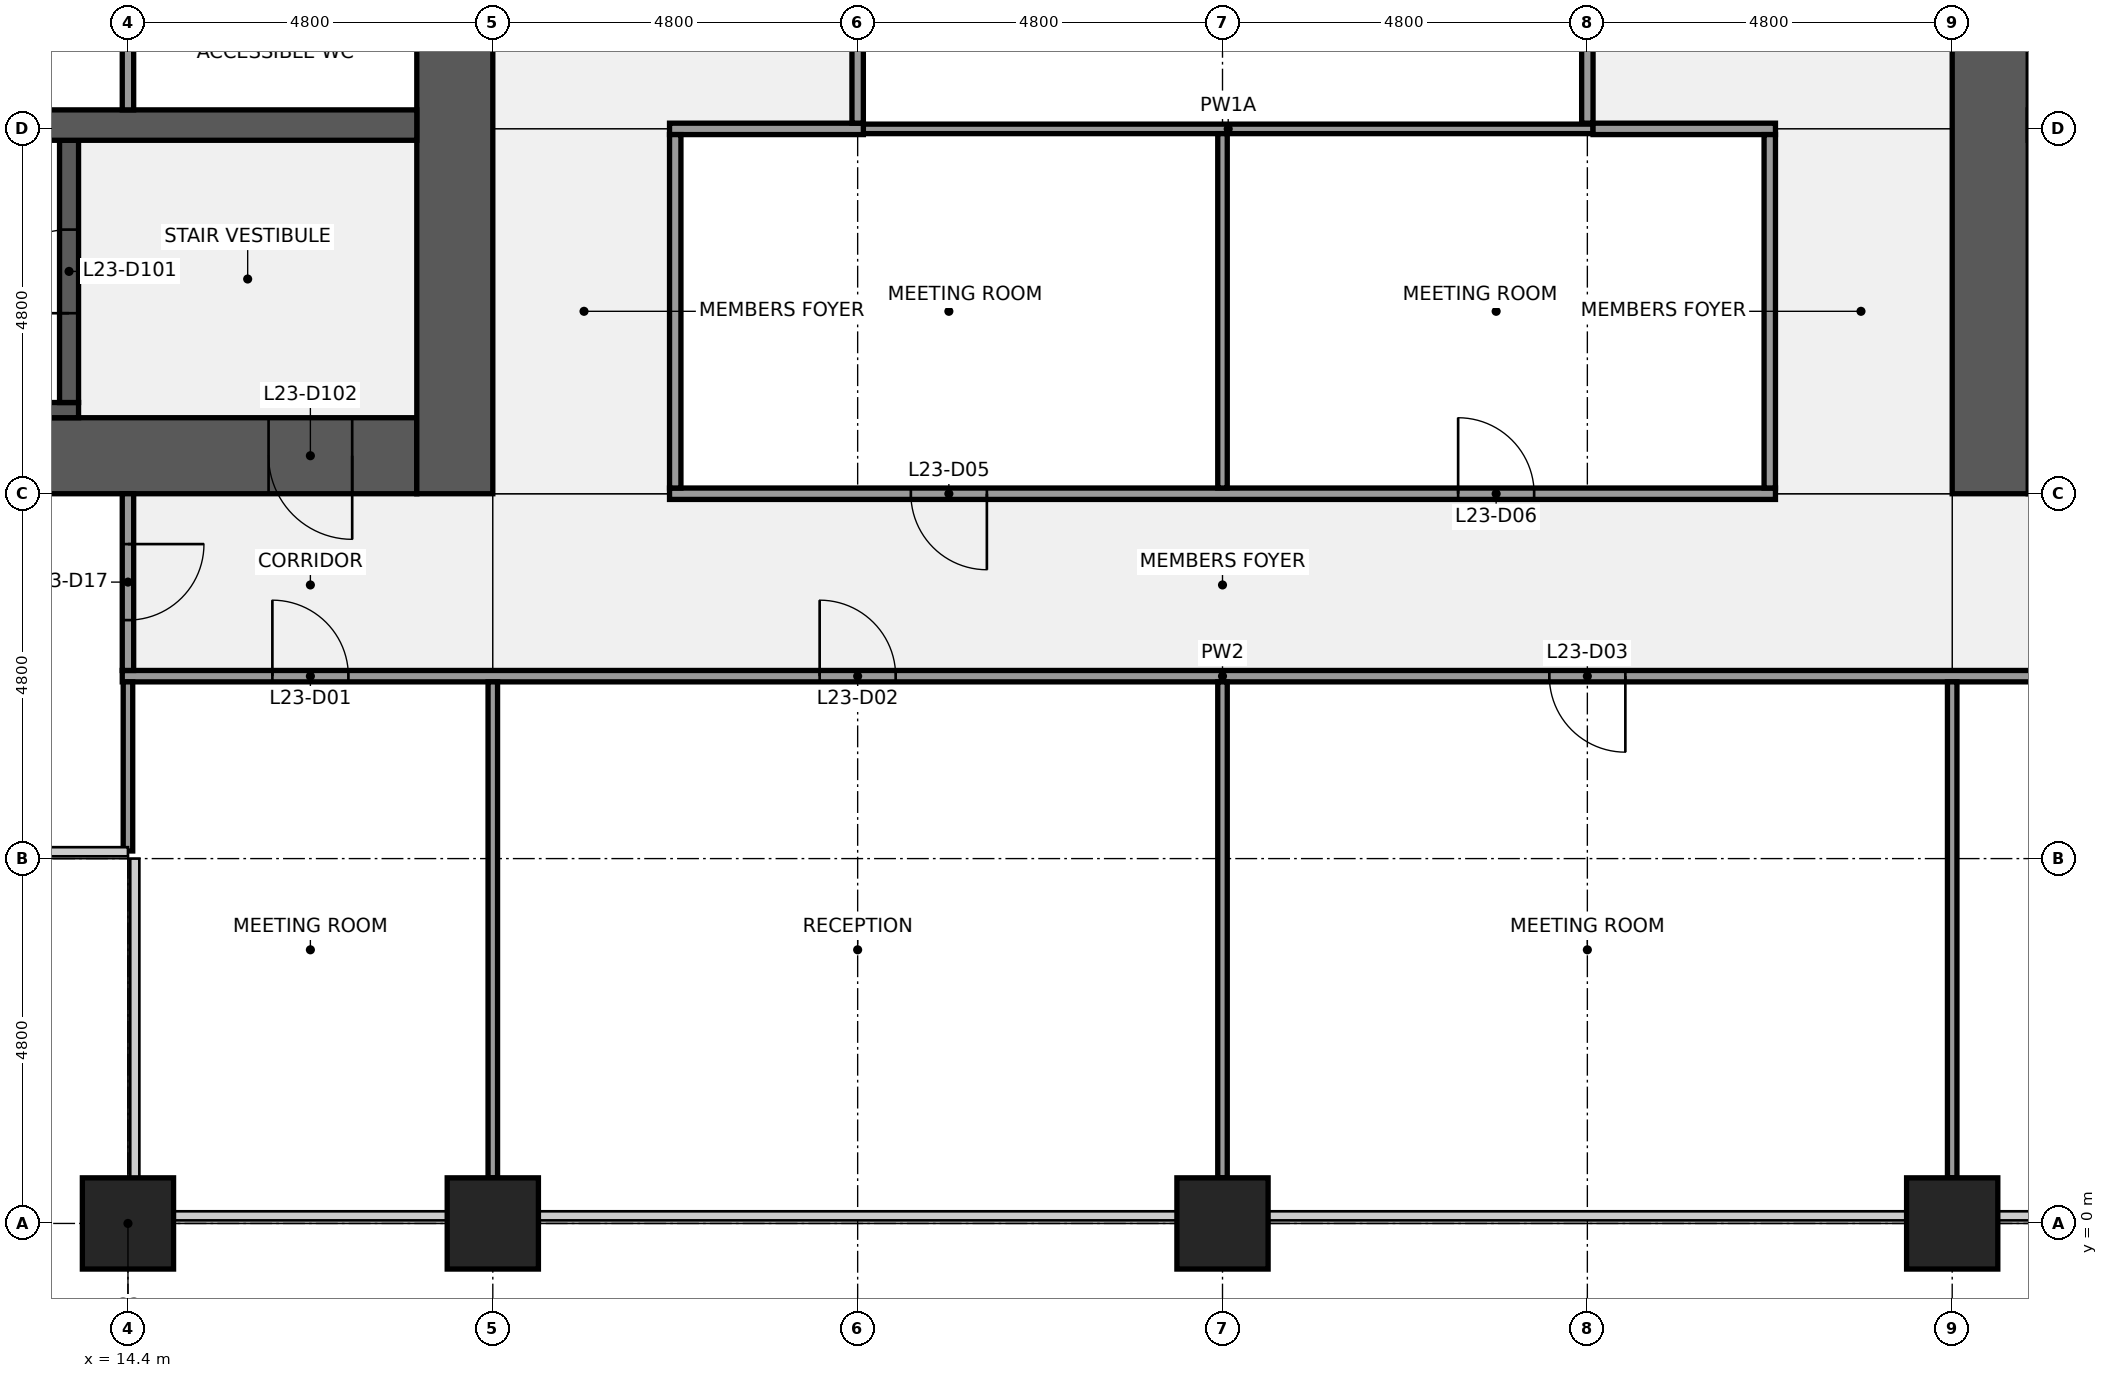
"""IFC4 building model, lengths in metres.
Left out: names, types, materials, properties, quantities, classifications, styles, units other than length and angle.
Written with IfcOpenShell. Run it as: python <this file> out.ifc"""

import sys

from ifc_helpers import new_model, si_unit, direction, frame, frame_2d, origin, origin_2d, place, context, subcontext, project, spatial, rectangle, extrude, element, fill, save


model = new_model("IFC4")
c1 = context("Model", 3, precision=1e-05, world=origin(), true_north=direction((0.0, 1.0)))
c2 = subcontext(c1, "Body", "Model", "MODEL_VIEW")
j1 = project(units=[si_unit("LENGTHUNIT", "METRE"), si_unit("PLANEANGLEUNIT", "RADIAN")], contexts=[c1])
p1 = place(None, origin())
s1 = spatial("IfcSite", under=j1, at=p1, CompositionType="ELEMENT")
p2 = place(p1, origin())
s2 = spatial("IfcBuilding", under=s1, at=p2, CompositionType="ELEMENT")
p3 = place(p2, frame((0.0, 0.0, 112.1)))
s3 = spatial("IfcBuildingStorey", under=s2, at=p3, CompositionType="ELEMENT", Elevation=112.1)
for number, where, z_axis, x_axis in (
    (1, (14.4, 0.0, 0.0), (0.0, 0.0, 1.0), (1.0, 0.0, 0.0)),
    (2, (19.2, 0.0, 0.0), (0.0, 0.0, 1.0), (1.0, 0.0, 0.0)),
    (3, (28.8, 0.0, 0.0), (0.0, 0.0, 1.0), (1.0, 0.0, 0.0)),
    (4, (38.4, 0.0, 0.0), (0.0, 0.0, 1.0), (1.0, 0.0, 0.0)),
):
    element("IfcColumn", number, at=place(p3, frame(where, z_axis=z_axis, x_axis=x_axis)), inside=s3, PredefinedType="COLUMN", context=c2, shape_type="SweptSolid", body=[
        extrude(rectangle(XDim=1.2, YDim=1.2, at=origin_2d()), origin(), (0.0, 0.0, 1.0), 4.0),
    ])
p4 = place(p3, frame((18.2, 10.1, 0.0), z_axis=(0.0, 0.0, 1.0), x_axis=(-1.0, 0.0, 0.0)))
e5 = element("IfcWall", 5, at=p4, inside=s3, PredefinedType="SHEAR", context=c2, shape_type="SweptSolid", body=[
    extrude(rectangle(XDim=8.6, YDim=1.0, at=frame_2d((4.3, 0.0))), origin(), (0.0, 0.0, 1.0), 3.84),
])
p5 = place(p4, frame((0.85, 0.0, 0.0)))
e6 = element("IfcOpeningElement", 6, at=p5, cuts=e5, PredefinedType="OPENING", context=c2, shape_type="SweptSolid", body=[
    extrude(rectangle(XDim=1.1, YDim=2.1, at=frame_2d((0.55, 1.05))), frame((0.0, 0.51, 0.0), z_axis=(0.0, -1.0, 0.0), x_axis=(1.0, 0.0, 0.0)), (0.0, 0.0, 1.0), 1.02),
])
p6 = place(p3, frame((18.7, 38.4, 0.0), z_axis=(0.0, 0.0, 1.0), x_axis=(0.0, -1.0, 0.0)))
e7 = element("IfcWall", 7, at=p6, inside=s3, PredefinedType="SHEAR", context=c2, shape_type="SweptSolid", body=[
    extrude(rectangle(XDim=28.8, YDim=1.0, at=frame_2d((14.4, 0.0))), origin(), (0.0, 0.0, 1.0), 3.84),
])
p7 = place(p6, frame((18.3, 0.0, 0.0)))
e8 = element("IfcOpeningElement", 8, at=p7, cuts=e7, PredefinedType="OPENING", context=c2, shape_type="SweptSolid", body=[
    extrude(rectangle(XDim=1.8, YDim=2.1, at=frame_2d((0.9, 1.05))), frame((0.0, 0.51, 0.0), z_axis=(0.0, -1.0, 0.0), x_axis=(1.0, 0.0, 0.0)), (0.0, 0.0, 1.0), 1.02),
])
p8 = place(p6, frame((8.7, 0.0, 0.0)))
e9 = element("IfcOpeningElement", 9, at=p8, cuts=e7, PredefinedType="OPENING", context=c2, shape_type="SweptSolid", body=[
    extrude(rectangle(XDim=1.8, YDim=2.1, at=frame_2d((0.9, 1.05))), frame((0.0, 0.51, 0.0), z_axis=(0.0, -1.0, 0.0), x_axis=(1.0, 0.0, 0.0)), (0.0, 0.0, 1.0), 1.02),
])
p9 = place(p3, frame((9.6, 10.7, 0.0), z_axis=(0.0, 0.0, 1.0), x_axis=(1.0, 0.0, 0.0)))
e10 = element("IfcWall", 10, at=p9, inside=s3, PredefinedType="SHEAR", context=c2, shape_type="SweptSolid", body=[
    extrude(rectangle(XDim=4.15, YDim=0.2, at=frame_2d((2.075, 0.0))), origin(), (0.0, 0.0, 1.0), 3.84),
])
p10 = place(p3, frame((13.625, 10.8, 0.0), z_axis=(0.0, 0.0, 1.0), x_axis=(0.0, 1.0, 0.0)))
e11 = element("IfcWall", 11, at=p10, inside=s3, PredefinedType="SHEAR", context=c2, shape_type="SweptSolid", body=[
    extrude(rectangle(XDim=3.45, YDim=0.25, at=frame_2d((1.725, 0.0))), origin(), (0.0, 0.0, 1.0), 3.84),
])
p11 = place(p10, frame((1.175, 0.0, 0.0)))
e12 = element("IfcOpeningElement", 12, at=p11, cuts=e11, PredefinedType="OPENING", context=c2, shape_type="SweptSolid", body=[
    extrude(rectangle(XDim=1.1, YDim=2.1, at=frame_2d((0.55, 1.05))), frame((0.0, 0.135, 0.0), z_axis=(0.0, -1.0, 0.0), x_axis=(1.0, 0.0, 0.0)), (0.0, 0.0, 1.0), 0.27),
])
p12 = place(p3, frame((1.0, 14.45, 0.0), z_axis=(0.0, 0.0, 1.0), x_axis=(1.0, 0.0, 0.0)))
e13 = element("IfcWall", 13, at=p12, inside=s3, PredefinedType="SHEAR", context=c2, shape_type="SweptSolid", body=[
    extrude(rectangle(XDim=17.2, YDim=0.4, at=frame_2d((8.6, 0.0))), origin(), (0.0, 0.0, 1.0), 3.84),
])
p13 = place(p3, frame((14.4, 14.65, 0.0), z_axis=(0.0, 0.0, 1.0), x_axis=(0.0, 1.0, 0.0)))
e14 = element("IfcWall", 14, at=p13, inside=s3, PredefinedType="PARTITIONING", context=c2, shape_type="SweptSolid", body=[
    extrude(rectangle(XDim=2.6, YDim=0.15, at=frame_2d((1.3, 0.0))), origin(), (0.0, 0.0, 1.0), 3.84),
])
p14 = place(p3, frame((52.8, 10.1, 0.0), z_axis=(0.0, 0.0, 1.0), x_axis=(-1.0, 0.0, 0.0)))
e15 = element("IfcWall", 15, at=p14, inside=s3, PredefinedType="SHEAR", context=c2, shape_type="SweptSolid", body=[
    extrude(rectangle(XDim=13.4, YDim=1.0, at=frame_2d((6.7, 0.0))), origin(), (0.0, 0.0, 1.0), 3.84),
])
p15 = place(p14, frame((11.45, 0.0, 0.0)))
e16 = element("IfcOpeningElement", 16, at=p15, cuts=e15, PredefinedType="OPENING", context=c2, shape_type="SweptSolid", body=[
    extrude(rectangle(XDim=1.1, YDim=2.1, at=frame_2d((0.55, 1.05))), frame((0.0, 0.51, 0.0), z_axis=(0.0, -1.0, 0.0), x_axis=(1.0, 0.0, 0.0)), (0.0, 0.0, 1.0), 1.02),
])
p16 = place(p3, frame((38.9, 9.6, 0.0), z_axis=(0.0, 0.0, 1.0), x_axis=(0.0, 1.0, 0.0)))
e17 = element("IfcWall", 17, at=p16, inside=s3, PredefinedType="SHEAR", context=c2, shape_type="SweptSolid", body=[
    extrude(rectangle(XDim=28.8, YDim=1.0, at=frame_2d((14.4, 0.0))), origin(), (0.0, 0.0, 1.0), 3.84),
])
p17 = place(p16, frame((8.7, 0.0, 0.0)))
e18 = element("IfcOpeningElement", 18, at=p17, cuts=e17, PredefinedType="OPENING", context=c2, shape_type="SweptSolid", body=[
    extrude(rectangle(XDim=1.8, YDim=2.1, at=frame_2d((0.9, 1.05))), frame((0.0, 0.51, 0.0), z_axis=(0.0, -1.0, 0.0), x_axis=(1.0, 0.0, 0.0)), (0.0, 0.0, 1.0), 1.02),
])
p18 = place(p16, frame((18.3, 0.0, 0.0)))
e19 = element("IfcOpeningElement", 19, at=p18, cuts=e17, PredefinedType="OPENING", context=c2, shape_type="SweptSolid", body=[
    extrude(rectangle(XDim=1.8, YDim=2.1, at=frame_2d((0.9, 1.05))), frame((0.0, 0.51, 0.0), z_axis=(0.0, -1.0, 0.0), x_axis=(1.0, 0.0, 0.0)), (0.0, 0.0, 1.0), 1.02),
])
p19 = place(p3, frame((14.325, 7.2, 0.0), z_axis=(0.0, 0.0, 1.0), x_axis=(1.0, 0.0, 0.0)))
e20 = element("IfcWall", 20, at=p19, inside=s3, PredefinedType="PARTITIONING", context=c2, shape_type="SweptSolid", body=[
    extrude(rectangle(XDim=28.95, YDim=0.15, at=frame_2d((14.475, 0.0))), origin(), (0.0, 0.0, 1.0), 2.849),
])
p20 = place(p19, frame((1.975, 0.0, 0.0)))
e21 = element("IfcOpeningElement", 21, at=p20, cuts=e20, PredefinedType="OPENING", context=c2, shape_type="SweptSolid", body=[
    extrude(rectangle(XDim=1.0, YDim=2.1, at=frame_2d((0.5, 1.05))), frame((0.0, 0.085, 0.0), z_axis=(0.0, -1.0, 0.0), x_axis=(1.0, 0.0, 0.0)), (0.0, 0.0, 1.0), 0.17),
])
p21 = place(p19, frame((9.175, 0.0, 0.0)))
e22 = element("IfcOpeningElement", 22, at=p21, cuts=e20, PredefinedType="OPENING", context=c2, shape_type="SweptSolid", body=[
    extrude(rectangle(XDim=1.0, YDim=2.1, at=frame_2d((0.5, 1.05))), frame((0.0, 0.085, 0.0), z_axis=(0.0, -1.0, 0.0), x_axis=(1.0, 0.0, 0.0)), (0.0, 0.0, 1.0), 0.17),
])
p22 = place(p19, frame((18.775, 0.0, 0.0)))
e23 = element("IfcOpeningElement", 23, at=p22, cuts=e20, PredefinedType="OPENING", context=c2, shape_type="SweptSolid", body=[
    extrude(rectangle(XDim=1.0, YDim=2.1, at=frame_2d((0.5, 1.05))), frame((0.0, 0.085, 0.0), z_axis=(0.0, -1.0, 0.0), x_axis=(1.0, 0.0, 0.0)), (0.0, 0.0, 1.0), 0.17),
])
p23 = place(p19, frame((25.975, 0.0, 0.0)))
e24 = element("IfcOpeningElement", 24, at=p23, cuts=e20, PredefinedType="OPENING", context=c2, shape_type="SweptSolid", body=[
    extrude(rectangle(XDim=1.0, YDim=2.1, at=frame_2d((0.5, 1.05))), frame((0.0, 0.085, 0.0), z_axis=(0.0, -1.0, 0.0), x_axis=(1.0, 0.0, 0.0)), (0.0, 0.0, 1.0), 0.17),
])
p24 = place(p3, frame((21.525, 9.6, 0.0), z_axis=(0.0, 0.0, 1.0), x_axis=(1.0, 0.0, 0.0)))
e25 = element("IfcWall", 25, at=p24, inside=s3, PredefinedType="PARTITIONING", context=c2, shape_type="SweptSolid", body=[
    extrude(rectangle(XDim=14.55, YDim=0.15, at=frame_2d((7.275, 0.0))), origin(), (0.0, 0.0, 1.0), 2.849),
])
p25 = place(p24, frame((3.175, 0.0, 0.0)))
e26 = element("IfcOpeningElement", 26, at=p25, cuts=e25, PredefinedType="OPENING", context=c2, shape_type="SweptSolid", body=[
    extrude(rectangle(XDim=1.0, YDim=2.1, at=frame_2d((0.5, 1.05))), frame((0.0, 0.085, 0.0), z_axis=(0.0, -1.0, 0.0), x_axis=(1.0, 0.0, 0.0)), (0.0, 0.0, 1.0), 0.17),
])
p26 = place(p24, frame((10.375, 0.0, 0.0)))
e27 = element("IfcOpeningElement", 27, at=p26, cuts=e25, PredefinedType="OPENING", context=c2, shape_type="SweptSolid", body=[
    extrude(rectangle(XDim=1.0, YDim=2.1, at=frame_2d((0.5, 1.05))), frame((0.0, 0.085, 0.0), z_axis=(0.0, -1.0, 0.0), x_axis=(1.0, 0.0, 0.0)), (0.0, 0.0, 1.0), 0.17),
])
p27 = place(p3, frame((24.075, 14.4, 0.0), z_axis=(0.0, 0.0, 1.0), x_axis=(1.0, 0.0, 0.0)))
e28 = element("IfcWall", 28, at=p27, inside=s3, PredefinedType="PARTITIONING", context=c2, shape_type="SweptSolid", body=[
    extrude(rectangle(XDim=9.6, YDim=0.125, at=frame_2d((4.8, 0.0))), origin(), (0.0, 0.0, 1.0), 2.849),
])
p28 = place(p3, frame((21.525, 14.4, 0.0), z_axis=(0.0, 0.0, 1.0), x_axis=(1.0, 0.0, 0.0)))
e29 = element("IfcWall", 29, at=p28, inside=s3, PredefinedType="PARTITIONING", context=c2, shape_type="SweptSolid", body=[
    extrude(rectangle(XDim=2.55, YDim=0.15, at=frame_2d((1.275, 0.0))), origin(), (0.0, 0.0, 1.0), 2.849),
])
p29 = place(p3, frame((33.675, 14.4, 0.0), z_axis=(0.0, 0.0, 1.0), x_axis=(1.0, 0.0, 0.0)))
e30 = element("IfcWall", 30, at=p29, inside=s3, PredefinedType="PARTITIONING", context=c2, shape_type="SweptSolid", body=[
    extrude(rectangle(XDim=2.4, YDim=0.15, at=frame_2d((1.2, 0.0))), origin(), (0.0, 0.0, 1.0), 2.849),
])
p30 = place(p3, frame((14.4, 4.9, 0.0), z_axis=(0.0, 0.0, 1.0), x_axis=(0.0, 1.0, 0.0)))
e31 = element("IfcWall", 31, at=p30, inside=s3, PredefinedType="PARTITIONING", context=c2, shape_type="SweptSolid", body=[
    extrude(rectangle(XDim=2.225, YDim=0.125, at=frame_2d((1.113, 0.0))), origin(), (0.0, 0.0, 1.0), 2.849),
])
p31 = place(p3, frame((14.4, 7.275, 0.0), z_axis=(0.0, 0.0, 1.0), x_axis=(0.0, 1.0, 0.0)))
e32 = element("IfcWall", 32, at=p31, inside=s3, PredefinedType="PARTITIONING", context=c2, shape_type="SweptSolid", body=[
    extrude(rectangle(XDim=2.325, YDim=0.15, at=frame_2d((1.163, 0.0))), origin(), (0.0, 0.0, 1.0), 2.849),
])
p32 = place(p31, frame((0.663, 0.0, 0.0)))
e33 = element("IfcOpeningElement", 33, at=p32, cuts=e32, PredefinedType="OPENING", context=c2, shape_type="SweptSolid", body=[
    extrude(rectangle(XDim=1.0, YDim=2.1, at=frame_2d((0.5, 1.05))), frame((0.0, 0.085, 0.0), z_axis=(0.0, -1.0, 0.0), x_axis=(1.0, 0.0, 0.0)), (0.0, 0.0, 1.0), 0.17),
])
p33 = place(p3, frame((19.2, 0.6, 0.0), z_axis=(0.0, 0.0, 1.0), x_axis=(0.0, 1.0, 0.0)))
e34 = element("IfcWall", 34, at=p33, inside=s3, PredefinedType="PARTITIONING", context=c2, shape_type="SweptSolid", body=[
    extrude(rectangle(XDim=6.525, YDim=0.125, at=frame_2d((3.262, 0.0))), origin(), (0.0, 0.0, 1.0), 2.849),
])
p34 = place(p3, frame((21.6, 9.675, 0.0), z_axis=(0.0, 0.0, 1.0), x_axis=(0.0, 1.0, 0.0)))
e35 = element("IfcWall", 35, at=p34, inside=s3, PredefinedType="PARTITIONING", context=c2, shape_type="SweptSolid", body=[
    extrude(rectangle(XDim=4.65, YDim=0.15, at=frame_2d((2.325, 0.0))), origin(), (0.0, 0.0, 1.0), 2.849),
])
p35 = place(p3, frame((24.0, 14.475, 0.0), z_axis=(0.0, 0.0, 1.0), x_axis=(0.0, 1.0, 0.0)))
e36 = element("IfcWall", 36, at=p35, inside=s3, PredefinedType="PARTITIONING", context=c2, shape_type="SweptSolid", body=[
    extrude(rectangle(XDim=3.45, YDim=0.15, at=frame_2d((1.725, 0.0))), origin(), (0.0, 0.0, 1.0), 2.849),
])
p36 = place(p3, frame((28.8, 0.6, 0.0), z_axis=(0.0, 0.0, 1.0), x_axis=(0.0, 1.0, 0.0)))
e37 = element("IfcWall", 37, at=p36, inside=s3, PredefinedType="PARTITIONING", context=c2, shape_type="SweptSolid", body=[
    extrude(rectangle(XDim=6.525, YDim=0.125, at=frame_2d((3.262, 0.0))), origin(), (0.0, 0.0, 1.0), 2.849),
])
p37 = place(p3, frame((28.8, 9.675, 0.0), z_axis=(0.0, 0.0, 1.0), x_axis=(0.0, 1.0, 0.0)))
e38 = element("IfcWall", 38, at=p37, inside=s3, PredefinedType="PARTITIONING", context=c2, shape_type="SweptSolid", body=[
    extrude(rectangle(XDim=4.662, YDim=0.125, at=frame_2d((2.331, 0.0))), origin(), (0.0, 0.0, 1.0), 2.849),
])
p38 = place(p3, frame((33.6, 14.475, 0.0), z_axis=(0.0, 0.0, 1.0), x_axis=(0.0, 1.0, 0.0)))
e39 = element("IfcWall", 39, at=p38, inside=s3, PredefinedType="PARTITIONING", context=c2, shape_type="SweptSolid", body=[
    extrude(rectangle(XDim=3.45, YDim=0.15, at=frame_2d((1.725, 0.0))), origin(), (0.0, 0.0, 1.0), 2.849),
])
p39 = place(p3, frame((36.0, 9.675, 0.0), z_axis=(0.0, 0.0, 1.0), x_axis=(0.0, 1.0, 0.0)))
e40 = element("IfcWall", 40, at=p39, inside=s3, PredefinedType="PARTITIONING", context=c2, shape_type="SweptSolid", body=[
    extrude(rectangle(XDim=4.65, YDim=0.15, at=frame_2d((2.325, 0.0))), origin(), (0.0, 0.0, 1.0), 2.849),
])
p40 = place(p3, frame((38.4, 0.6, 0.0), z_axis=(0.0, 0.0, 1.0), x_axis=(0.0, 1.0, 0.0)))
e41 = element("IfcWall", 41, at=p40, inside=s3, PredefinedType="PARTITIONING", context=c2, shape_type="SweptSolid", body=[
    extrude(rectangle(XDim=6.525, YDim=0.125, at=frame_2d((3.262, 0.0))), origin(), (0.0, 0.0, 1.0), 2.849),
])
for number, where, z_axis, x_axis in (
    (42, (14.4, -1.05, 0.0), (0.0, 0.0, 1.0), (1.0, 0.0, 0.0)),
    (43, (19.2, -1.05, 0.0), (0.0, 0.0, 1.0), (1.0, 0.0, 0.0)),
    (44, (38.4, -1.05, 0.0), (0.0, 0.0, 1.0), (1.0, 0.0, 0.0)),
):
    element("IfcColumn", number, at=place(p3, frame(where, z_axis=z_axis, x_axis=x_axis)), inside=s3, PredefinedType="PILASTER", context=c2, shape_type="SweptSolid", body=[
        extrude(rectangle(XDim=3.6, YDim=0.9, at=origin_2d()), origin(), (0.0, 0.0, 1.0), 4.0),
    ])
p41 = place(p11, origin())
e45 = element("IfcDoor", 45, at=p41, inside=s3, OperationType="SINGLE_SWING_LEFT", PredefinedType="DOOR", context=c2, shape_type="SweptSolid", body=[
    extrude(rectangle(XDim=1.1, YDim=2.1, at=frame_2d((0.55, 1.05))), frame((0.0, 0.025, 0.0), z_axis=(0.0, -1.0, 0.0), x_axis=(1.0, 0.0, 0.0)), (0.0, 0.0, 1.0), 0.05),
])
fill(e12, e45)
p42 = place(p5, origin())
e46 = element("IfcDoor", 46, at=p42, inside=s3, OperationType="SINGLE_SWING_LEFT", PredefinedType="DOOR", context=c2, shape_type="SweptSolid", body=[
    extrude(rectangle(XDim=1.1, YDim=2.1, at=frame_2d((0.55, 1.05))), frame((0.0, 0.025, 0.0), z_axis=(0.0, -1.0, 0.0), x_axis=(1.0, 0.0, 0.0)), (0.0, 0.0, 1.0), 0.05),
])
fill(e6, e46)
p43 = place(p20, origin())
e47 = element("IfcDoor", 47, at=p43, inside=s3, OperationType="SINGLE_SWING_LEFT", PredefinedType="DOOR", context=c2, shape_type="SweptSolid", body=[
    extrude(rectangle(XDim=1.0, YDim=2.1, at=frame_2d((0.5, 1.05))), frame((0.0, 0.025, 0.0), z_axis=(0.0, -1.0, 0.0), x_axis=(1.0, 0.0, 0.0)), (0.0, 0.0, 1.0), 0.05),
])
fill(e21, e47)
p44 = place(p21, origin())
e48 = element("IfcDoor", 48, at=p44, inside=s3, OperationType="SINGLE_SWING_LEFT", PredefinedType="DOOR", context=c2, shape_type="SweptSolid", body=[
    extrude(rectangle(XDim=1.0, YDim=2.1, at=frame_2d((0.5, 1.05))), frame((0.0, 0.025, 0.0), z_axis=(0.0, -1.0, 0.0), x_axis=(1.0, 0.0, 0.0)), (0.0, 0.0, 1.0), 0.05),
])
fill(e22, e48)
p45 = place(p22, origin())
e49 = element("IfcDoor", 49, at=p45, inside=s3, OperationType="SINGLE_SWING_RIGHT", PredefinedType="DOOR", context=c2, shape_type="SweptSolid", body=[
    extrude(rectangle(XDim=1.0, YDim=2.1, at=frame_2d((0.5, 1.05))), frame((0.0, 0.025, 0.0), z_axis=(0.0, -1.0, 0.0), x_axis=(1.0, 0.0, 0.0)), (0.0, 0.0, 1.0), 0.05),
])
fill(e23, e49)
p46 = place(p25, origin())
e50 = element("IfcDoor", 50, at=p46, inside=s3, OperationType="SINGLE_SWING_RIGHT", PredefinedType="DOOR", context=c2, shape_type="SweptSolid", body=[
    extrude(rectangle(XDim=1.0, YDim=2.1, at=frame_2d((0.5, 1.05))), frame((0.0, 0.025, 0.0), z_axis=(0.0, -1.0, 0.0), x_axis=(1.0, 0.0, 0.0)), (0.0, 0.0, 1.0), 0.05),
])
fill(e26, e50)
p47 = place(p26, origin())
e51 = element("IfcDoor", 51, at=p47, inside=s3, OperationType="SINGLE_SWING_LEFT", PredefinedType="DOOR", context=c2, shape_type="SweptSolid", body=[
    extrude(rectangle(XDim=1.0, YDim=2.1, at=frame_2d((0.5, 1.05))), frame((0.0, 0.025, 0.0), z_axis=(0.0, -1.0, 0.0), x_axis=(1.0, 0.0, 0.0)), (0.0, 0.0, 1.0), 0.05),
])
fill(e27, e51)
p48 = place(p32, origin())
e52 = element("IfcDoor", 52, at=p48, inside=s3, OperationType="SINGLE_SWING_RIGHT", PredefinedType="DOOR", context=c2, shape_type="SweptSolid", body=[
    extrude(rectangle(XDim=1.0, YDim=2.1, at=frame_2d((0.5, 1.05))), frame((0.0, 0.025, 0.0), z_axis=(0.0, -1.0, 0.0), x_axis=(1.0, 0.0, 0.0)), (0.0, 0.0, 1.0), 0.05),
])
fill(e33, e52)
save(model, sys.argv[1])
